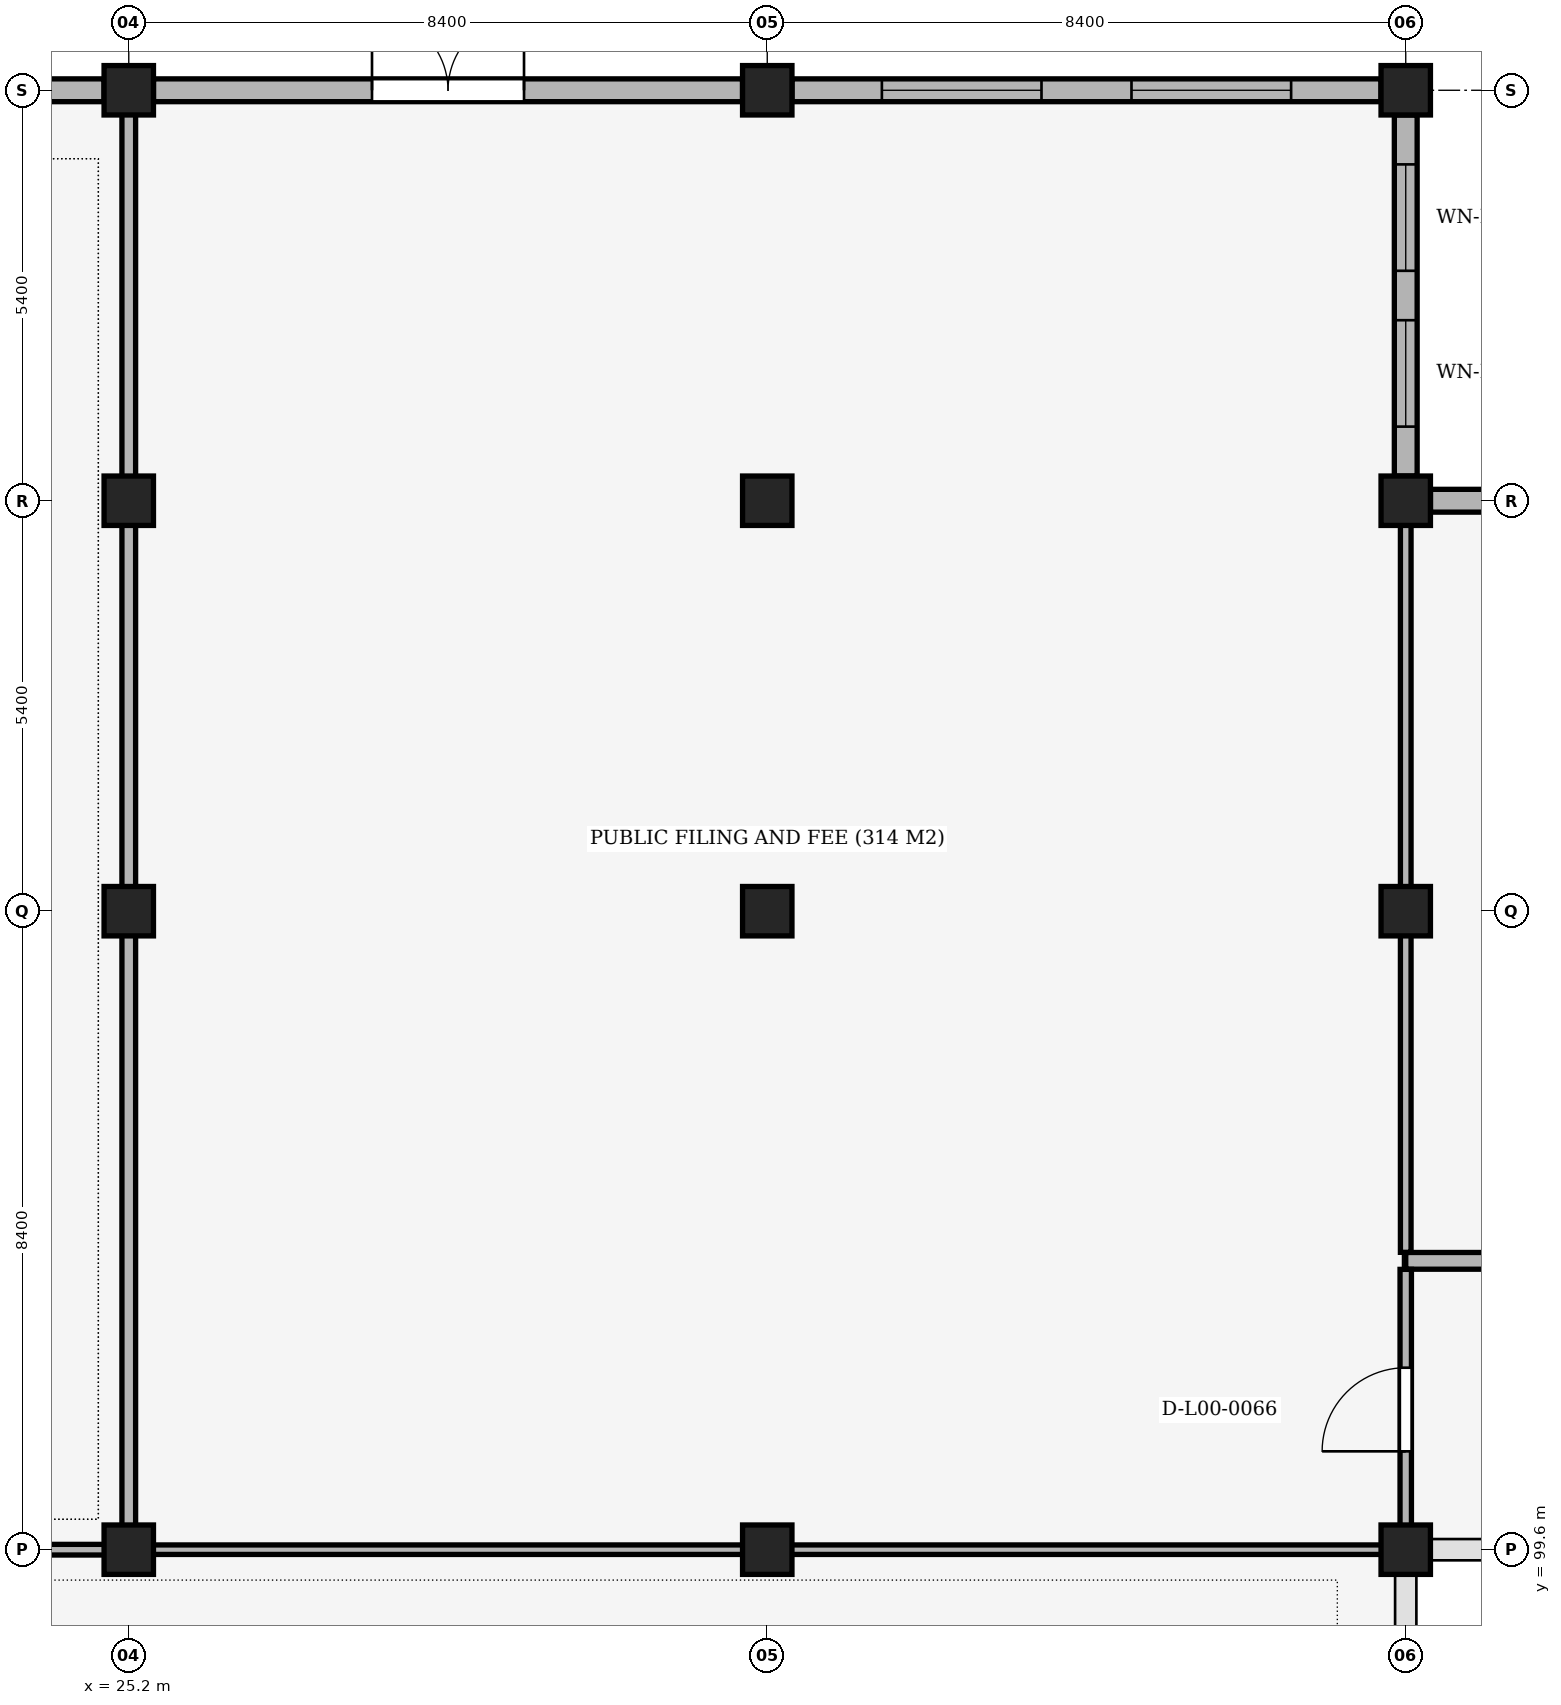
"""IFC4 building model, lengths in metres.
Left out: names, types, materials, properties, quantities, classifications, styles, units other than length and angle.
Written with IfcOpenShell. Run it as: python <this file> out.ifc"""

import sys

from ifc_helpers import new_model, si_unit, direction, frame, frame_2d, origin, origin_2d, place, context, subcontext, project, spatial, rectangle, extrude, element, fill, save


model = new_model("IFC4")
c1 = context("Model", 3, precision=1e-05, world=origin(), true_north=direction((0.0, 1.0)))
c2 = subcontext(c1, "Body", "Model", "MODEL_VIEW")
j1 = project(units=[si_unit("LENGTHUNIT", "METRE"), si_unit("PLANEANGLEUNIT", "RADIAN")], contexts=[c1])
p1 = place(None, origin())
s1 = spatial("IfcSite", under=j1, at=p1, CompositionType="ELEMENT")
p2 = place(p1, origin())
s2 = spatial("IfcBuilding", under=s1, at=p2, CompositionType="ELEMENT")
p3 = place(p2, origin())
s3 = spatial("IfcBuildingStorey", under=s2, at=p3, CompositionType="ELEMENT", Elevation=0.0)
for number, where, z_axis, x_axis in (
    (1, (25.2, 99.6, 0.0), (0.0, 0.0, 1.0), (1.0, 0.0, 0.0)),
    (2, (25.2, 108.0, 0.0), (0.0, 0.0, 1.0), (1.0, 0.0, 0.0)),
    (3, (25.2, 113.4, 0.0), (0.0, 0.0, 1.0), (1.0, 0.0, 0.0)),
    (4, (25.2, 118.8, 0.0), (0.0, 0.0, 1.0), (1.0, 0.0, 0.0)),
    (5, (33.6, 99.6, 0.0), (0.0, 0.0, 1.0), (1.0, 0.0, 0.0)),
    (6, (33.6, 108.0, 0.0), (0.0, 0.0, 1.0), (1.0, 0.0, 0.0)),
    (7, (33.6, 113.4, 0.0), (0.0, 0.0, 1.0), (1.0, 0.0, 0.0)),
    (8, (33.6, 118.8, 0.0), (0.0, 0.0, 1.0), (1.0, 0.0, 0.0)),
    (9, (42.0, 99.6, 0.0), (0.0, 0.0, 1.0), (1.0, 0.0, 0.0)),
    (10, (42.0, 108.0, 0.0), (0.0, 0.0, 1.0), (1.0, 0.0, 0.0)),
    (11, (42.0, 113.4, 0.0), (0.0, 0.0, 1.0), (1.0, 0.0, 0.0)),
    (12, (42.0, 118.8, 0.0), (0.0, 0.0, 1.0), (1.0, 0.0, 0.0)),
):
    element("IfcColumn", number, at=place(p3, frame(where, z_axis=z_axis, x_axis=x_axis)), inside=s3, PredefinedType="COLUMN", context=c2, shape_type="SweptSolid", body=[
        extrude(rectangle(XDim=0.65, YDim=0.65, at=origin_2d()), origin(), (0.0, 0.0, 1.0), 5.1),
    ])
p4 = place(p3, frame((17.125, 118.8, 0.0), z_axis=(0.0, 0.0, 1.0), x_axis=(1.0, 0.0, 0.0)))
e13 = element("IfcWall", 13, at=p4, inside=s3, PredefinedType="SOLIDWALL", context=c2, shape_type="SweptSolid", body=[
    extrude(rectangle(XDim=7.75, YDim=0.3, at=frame_2d((3.875, 0.0))), origin(), (0.0, 0.0, 1.0), 4.12),
])
p5 = place(p4, frame((2.875, 0.0, 0.0)))
e14 = element("IfcOpeningElement", 14, at=p5, cuts=e13, PredefinedType="OPENING", context=c2, shape_type="SweptSolid", body=[
    extrude(rectangle(XDim=2.0, YDim=2.4, at=frame_2d((1.0, 1.2))), frame((0.0, 0.165, 0.0), z_axis=(0.0, -1.0, 0.0), x_axis=(1.0, 0.0, 0.0)), (0.0, 0.0, 1.0), 0.33),
])
p6 = place(p3, frame((25.525, 118.8, 0.0), z_axis=(0.0, 0.0, 1.0), x_axis=(1.0, 0.0, 0.0)))
e15 = element("IfcWall", 15, at=p6, inside=s3, PredefinedType="SOLIDWALL", context=c2, shape_type="SweptSolid", body=[
    extrude(rectangle(XDim=7.75, YDim=0.3, at=frame_2d((3.875, 0.0))), origin(), (0.0, 0.0, 1.0), 4.12),
])
p7 = place(p6, frame((2.875, 0.0, 0.0)))
e16 = element("IfcOpeningElement", 16, at=p7, cuts=e15, PredefinedType="OPENING", context=c2, shape_type="SweptSolid", body=[
    extrude(rectangle(XDim=2.0, YDim=2.4, at=frame_2d((1.0, 1.2))), frame((0.0, 0.165, 0.0), z_axis=(0.0, -1.0, 0.0), x_axis=(1.0, 0.0, 0.0)), (0.0, 0.0, 1.0), 0.33),
])
p8 = place(p3, frame((33.925, 118.8, 0.0), z_axis=(0.0, 0.0, 1.0), x_axis=(1.0, 0.0, 0.0)))
e17 = element("IfcWall", 17, at=p8, inside=s3, PredefinedType="SOLIDWALL", context=c2, shape_type="SweptSolid", body=[
    extrude(rectangle(XDim=7.75, YDim=0.3, at=frame_2d((3.875, 0.0))), origin(), (0.0, 0.0, 1.0), 4.12),
])
p9 = place(p8, frame((1.183, 0.0, 0.9)))
e18 = element("IfcOpeningElement", 18, at=p9, cuts=e17, PredefinedType="OPENING", context=c2, shape_type="SweptSolid", body=[
    extrude(rectangle(XDim=2.1, YDim=2.1, at=frame_2d((1.05, 1.05))), frame((0.0, 0.165, 0.0), z_axis=(0.0, -1.0, 0.0), x_axis=(1.0, 0.0, 0.0)), (0.0, 0.0, 1.0), 0.33),
])
p10 = place(p8, frame((4.467, 0.0, 0.9)))
e19 = element("IfcOpeningElement", 19, at=p10, cuts=e17, PredefinedType="OPENING", context=c2, shape_type="SweptSolid", body=[
    extrude(rectangle(XDim=2.1, YDim=2.1, at=frame_2d((1.05, 1.05))), frame((0.0, 0.165, 0.0), z_axis=(0.0, -1.0, 0.0), x_axis=(1.0, 0.0, 0.0)), (0.0, 0.0, 1.0), 0.33),
])
p11 = place(p3, frame((42.0, 118.475, 0.0), z_axis=(0.0, 0.0, 1.0), x_axis=(0.0, -1.0, 0.0)))
e20 = element("IfcWall", 20, at=p11, inside=s3, PredefinedType="SOLIDWALL", context=c2, shape_type="SweptSolid", body=[
    extrude(rectangle(XDim=4.75, YDim=0.3, at=frame_2d((2.375, 0.0))), origin(), (0.0, 0.0, 1.0), 4.17),
])
p12 = place(p11, frame((0.65, 0.0, 0.85)))
e21 = element("IfcOpeningElement", 21, at=p12, cuts=e20, PredefinedType="OPENING", context=c2, shape_type="SweptSolid", body=[
    extrude(rectangle(XDim=1.4, YDim=2.4, at=frame_2d((0.7, 1.2))), frame((0.0, 0.165, 0.0), z_axis=(0.0, -1.0, 0.0), x_axis=(1.0, 0.0, 0.0)), (0.0, 0.0, 1.0), 0.33),
])
p13 = place(p11, frame((2.7, 0.0, 0.85)))
e22 = element("IfcOpeningElement", 22, at=p13, cuts=e20, PredefinedType="OPENING", context=c2, shape_type="SweptSolid", body=[
    extrude(rectangle(XDim=1.4, YDim=2.4, at=frame_2d((0.7, 1.2))), frame((0.0, 0.165, 0.0), z_axis=(0.0, -1.0, 0.0), x_axis=(1.0, 0.0, 0.0)), (0.0, 0.0, 1.0), 0.33),
])
p14 = place(p3, frame((42.325, 113.4, 0.0), z_axis=(0.0, 0.0, 1.0), x_axis=(1.0, 0.0, 0.0)))
e23 = element("IfcWall", 23, at=p14, inside=s3, PredefinedType="SOLIDWALL", context=c2, shape_type="SweptSolid", body=[
    extrude(rectangle(XDim=7.75, YDim=0.3, at=frame_2d((3.875, 0.0))), origin(), (0.0, 0.0, 1.0), 4.12),
])
p15 = place(p14, frame((1.183, 0.0, 0.9)))
e24 = element("IfcOpeningElement", 24, at=p15, cuts=e23, PredefinedType="OPENING", context=c2, shape_type="SweptSolid", body=[
    extrude(rectangle(XDim=2.1, YDim=2.1, at=frame_2d((1.05, 1.05))), frame((0.0, 0.165, 0.0), z_axis=(0.0, -1.0, 0.0), x_axis=(1.0, 0.0, 0.0)), (0.0, 0.0, 1.0), 0.33),
])
p16 = place(p14, frame((4.467, 0.0, 0.9)))
e25 = element("IfcOpeningElement", 25, at=p16, cuts=e23, PredefinedType="OPENING", context=c2, shape_type="SweptSolid", body=[
    extrude(rectangle(XDim=2.1, YDim=2.1, at=frame_2d((1.05, 1.05))), frame((0.0, 0.165, 0.0), z_axis=(0.0, -1.0, 0.0), x_axis=(1.0, 0.0, 0.0)), (0.0, 0.0, 1.0), 0.33),
])
p17 = place(p3, frame((8.41, 99.6, 0.0), z_axis=(0.0, 0.0, 1.0), x_axis=(1.0, 0.0, 0.0)))
e26 = element("IfcWall", 26, at=p17, inside=s3, PredefinedType="PARTITIONING", context=c2, shape_type="SweptSolid", body=[
    extrude(rectangle(XDim=16.79, YDim=0.14, at=frame_2d((8.395, 0.0))), origin(), (0.0, 0.0, 1.0), 4.02),
])
p18 = place(p17, frame((4.895, 0.0, 0.0)))
e27 = element("IfcOpeningElement", 27, at=p18, cuts=e26, PredefinedType="OPENING", context=c2, shape_type="SweptSolid", body=[
    extrude(rectangle(XDim=1.6, YDim=2.3, at=frame_2d((0.8, 1.15))), frame((0.0, 0.085, 0.0), z_axis=(0.0, -1.0, 0.0), x_axis=(1.0, 0.0, 0.0)), (0.0, 0.0, 1.0), 0.17),
])
p19 = place(p3, frame((25.2, 99.6, 0.0), z_axis=(0.0, 0.0, 1.0), x_axis=(1.0, 0.0, 0.0)))
e28 = element("IfcWall", 28, at=p19, inside=s3, PredefinedType="PARTITIONING", context=c2, shape_type="SweptSolid", body=[
    extrude(rectangle(XDim=16.761, YDim=0.125, at=frame_2d((8.38, 0.0))), origin(), (0.0, 0.0, 1.0), 4.02),
])
p20 = place(p3, frame((42.0, 103.4, 0.0), z_axis=(0.0, 0.0, 1.0), x_axis=(1.0, 0.0, 0.0)))
e29 = element("IfcWall", 29, at=p20, inside=s3, PredefinedType="PARTITIONING", context=c2, shape_type="SweptSolid", body=[
    extrude(rectangle(XDim=33.6, YDim=0.22, at=frame_2d((16.8, 0.0))), origin(), (0.0, 0.0, 1.0), 4.02),
])
p21 = place(p20, frame((16.35, 0.0, 0.0)))
e30 = element("IfcOpeningElement", 30, at=p21, cuts=e29, PredefinedType="OPENING", context=c2, shape_type="SweptSolid", body=[
    extrude(rectangle(XDim=0.9, YDim=2.1, at=frame_2d((0.45, 1.05))), frame((0.0, 0.125, 0.0), z_axis=(0.0, -1.0, 0.0), x_axis=(1.0, 0.0, 0.0)), (0.0, 0.0, 1.0), 0.25),
])
p22 = place(p3, frame((25.2, 99.672, 0.0), z_axis=(0.0, 0.0, 1.0), x_axis=(0.0, 1.0, 0.0)))
e31 = element("IfcWall", 31, at=p22, inside=s3, PredefinedType="PARTITIONING", context=c2, shape_type="SweptSolid", body=[
    extrude(rectangle(XDim=19.079, YDim=0.18, at=frame_2d((9.54, 0.0))), origin(), (0.0, 0.0, 1.0), 4.02),
])
p23 = place(p3, frame((42.0, 99.6, 0.0), z_axis=(0.0, 0.0, 1.0), x_axis=(0.0, 1.0, 0.0)))
e32 = element("IfcWall", 32, at=p23, inside=s3, PredefinedType="PARTITIONING", context=c2, shape_type="SweptSolid", body=[
    extrude(rectangle(XDim=3.688, YDim=0.15, at=frame_2d((1.844, 0.0))), origin(), (0.0, 0.0, 1.0), 4.02),
])
p24 = place(p23, frame((1.294, 0.0, 0.0)))
e33 = element("IfcOpeningElement", 33, at=p24, cuts=e32, PredefinedType="OPENING", context=c2, shape_type="SweptSolid", body=[
    extrude(rectangle(XDim=1.1, YDim=2.2, at=frame_2d((0.55, 1.1))), frame((0.0, 0.09, 0.0), z_axis=(0.0, -1.0, 0.0), x_axis=(1.0, 0.0, 0.0)), (0.0, 0.0, 1.0), 0.18),
])
p25 = place(p3, frame((42.0, 103.512, 0.0), z_axis=(0.0, 0.0, 1.0), x_axis=(0.0, 1.0, 0.0)))
e34 = element("IfcWall", 34, at=p25, inside=s3, PredefinedType="PARTITIONING", context=c2, shape_type="SweptSolid", body=[
    extrude(rectangle(XDim=9.839, YDim=0.14, at=frame_2d((4.919, 0.0))), origin(), (0.0, 0.0, 1.0), 4.02),
])
p26 = place(p7, origin())
e35 = element("IfcDoor", 35, at=p26, inside=s3, OperationType="DOUBLE_DOOR_SINGLE_SWING", PredefinedType="DOOR", context=c2, shape_type="SweptSolid", body=[
    extrude(rectangle(XDim=2.0, YDim=2.4, at=frame_2d((1.0, 1.2))), frame((0.0, 0.025, 0.0), z_axis=(0.0, -1.0, 0.0), x_axis=(1.0, 0.0, 0.0)), (0.0, 0.0, 1.0), 0.05),
])
fill(e16, e35)
p27 = place(p9, origin())
e36 = element("IfcWindow", 36, at=p27, inside=s3, PartitioningType="SINGLE_PANEL", PredefinedType="WINDOW", context=c2, shape_type="SweptSolid", body=[
    extrude(rectangle(XDim=2.1, YDim=2.1, at=frame_2d((1.05, 1.05))), frame((0.0, 0.03, 0.0), z_axis=(0.0, -1.0, 0.0), x_axis=(1.0, 0.0, 0.0)), (0.0, 0.0, 1.0), 0.06),
])
fill(e18, e36)
p28 = place(p10, origin())
e37 = element("IfcWindow", 37, at=p28, inside=s3, PartitioningType="SINGLE_PANEL", PredefinedType="WINDOW", context=c2, shape_type="SweptSolid", body=[
    extrude(rectangle(XDim=2.1, YDim=2.1, at=frame_2d((1.05, 1.05))), frame((0.0, 0.03, 0.0), z_axis=(0.0, -1.0, 0.0), x_axis=(1.0, 0.0, 0.0)), (0.0, 0.0, 1.0), 0.06),
])
fill(e19, e37)
p29 = place(p12, origin())
e38 = element("IfcWindow", 38, at=p29, inside=s3, PartitioningType="SINGLE_PANEL", PredefinedType="WINDOW", context=c2, shape_type="SweptSolid", body=[
    extrude(rectangle(XDim=1.4, YDim=2.4, at=frame_2d((0.7, 1.2))), frame((0.0, 0.03, 0.0), z_axis=(0.0, -1.0, 0.0), x_axis=(1.0, 0.0, 0.0)), (0.0, 0.0, 1.0), 0.06),
])
fill(e21, e38)
p30 = place(p13, origin())
e39 = element("IfcWindow", 39, at=p30, inside=s3, PartitioningType="SINGLE_PANEL", PredefinedType="WINDOW", context=c2, shape_type="SweptSolid", body=[
    extrude(rectangle(XDim=1.4, YDim=2.4, at=frame_2d((0.7, 1.2))), frame((0.0, 0.03, 0.0), z_axis=(0.0, -1.0, 0.0), x_axis=(1.0, 0.0, 0.0)), (0.0, 0.0, 1.0), 0.06),
])
fill(e22, e39)
p31 = place(p24, origin())
e40 = element("IfcDoor", 40, at=p31, inside=s3, OperationType="SINGLE_SWING_LEFT", PredefinedType="DOOR", context=c2, shape_type="SweptSolid", body=[
    extrude(rectangle(XDim=1.1, YDim=2.2, at=frame_2d((0.55, 1.1))), frame((0.0, 0.025, 0.0), z_axis=(0.0, -1.0, 0.0), x_axis=(1.0, 0.0, 0.0)), (0.0, 0.0, 1.0), 0.05),
])
fill(e33, e40)
save(model, sys.argv[1])
